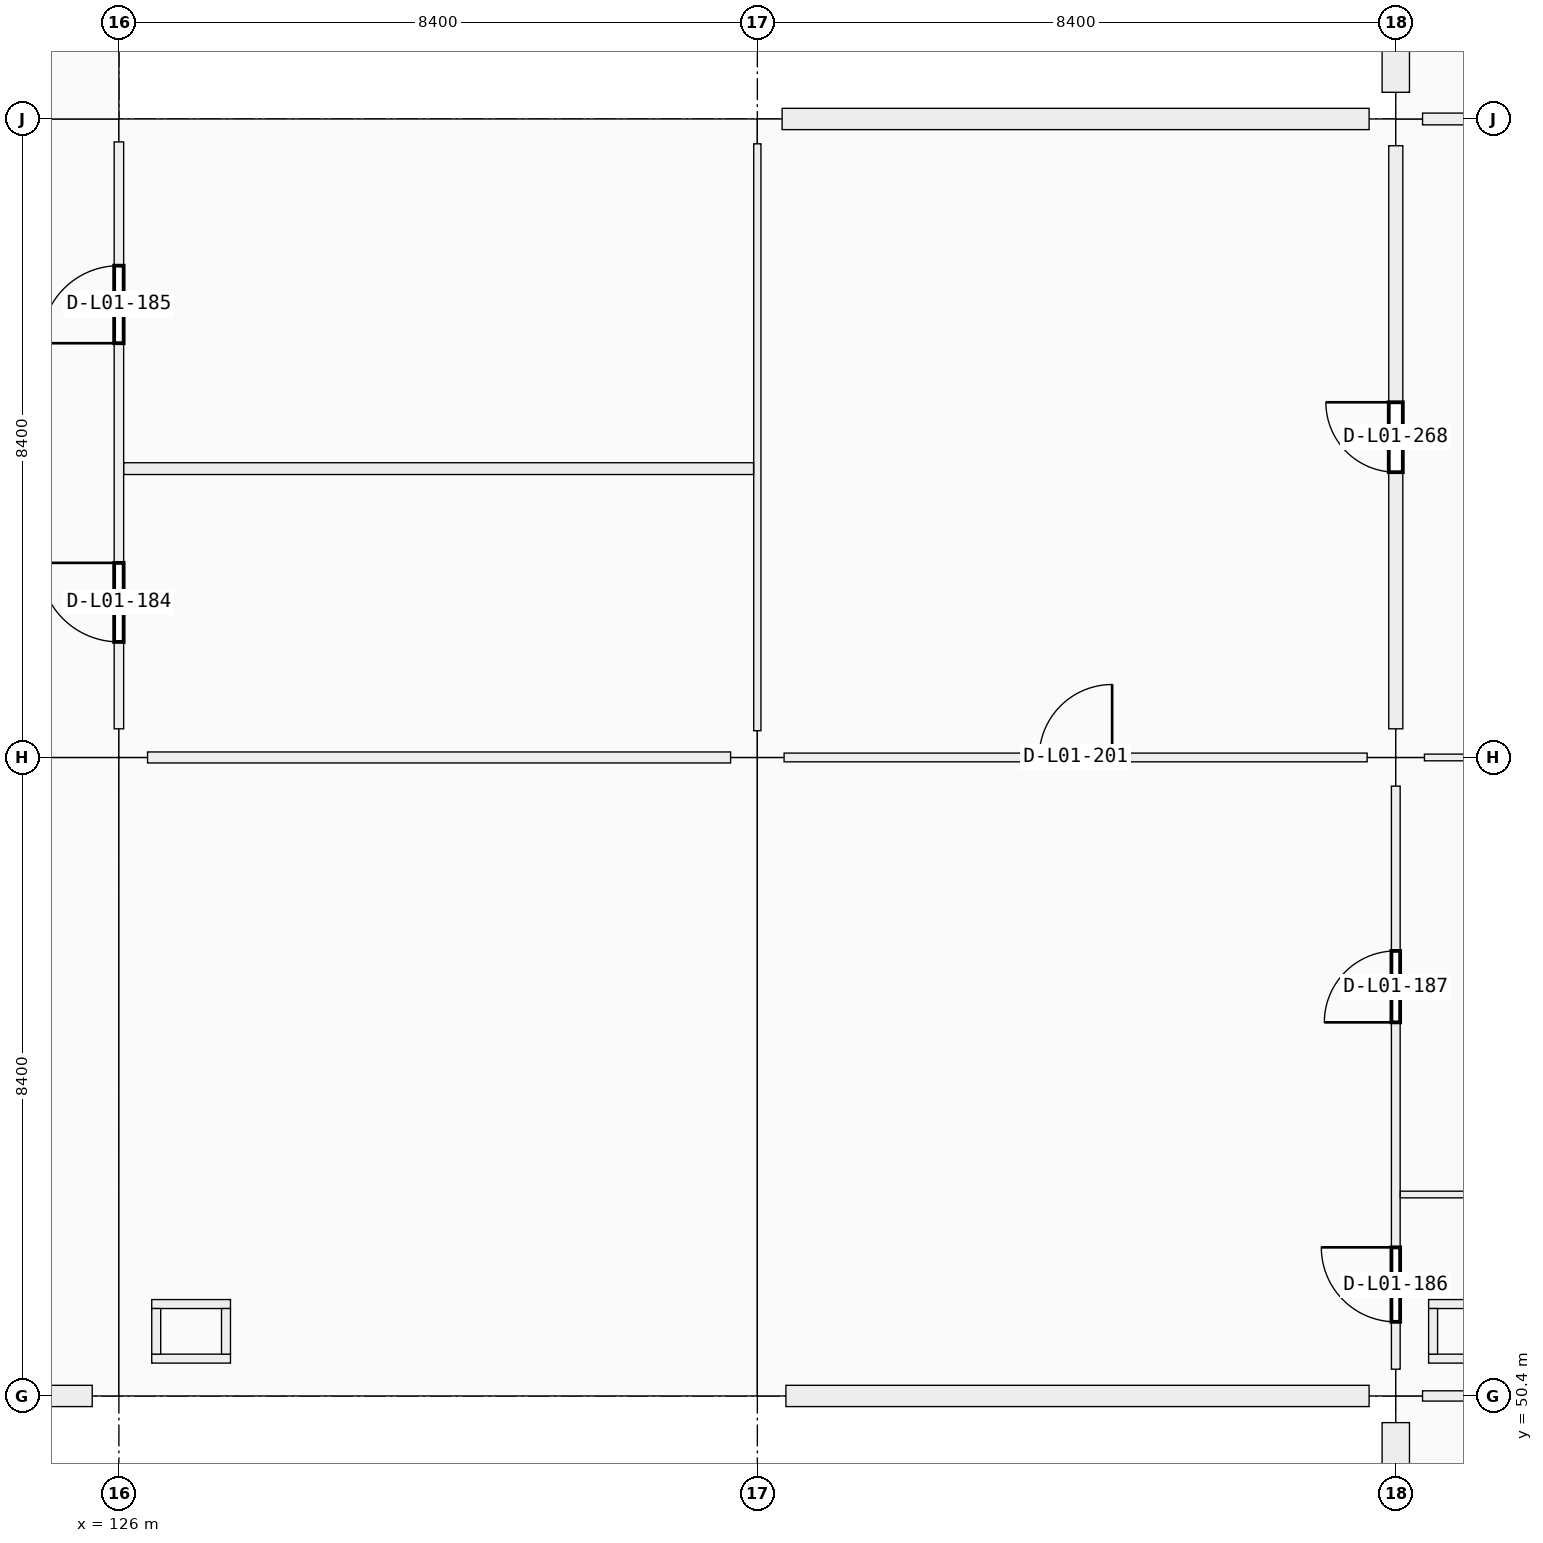
"""IFC4 building model, lengths in metres.
Left out: names, types, materials, properties, quantities, classifications, styles, units other than length and angle.
Written with IfcOpenShell. Run it as: python <this file> out.ifc"""

import sys

from ifc_helpers import new_model, si_unit, direction, frame, frame_2d, origin, origin_2d, place, context, subcontext, project, spatial, rectangle, extrude, element, fill, save


model = new_model("IFC4")
c1 = context("Model", 3, precision=1e-05, world=origin(), true_north=direction((0.0, 1.0)))
c2 = subcontext(c1, "Body", "Model", "MODEL_VIEW")
j1 = project(units=[si_unit("LENGTHUNIT", "METRE"), si_unit("PLANEANGLEUNIT", "RADIAN")], contexts=[c1])
p1 = place(None, origin())
s1 = spatial("IfcSite", under=j1, at=p1, CompositionType="ELEMENT")
p2 = place(p1, origin())
s2 = spatial("IfcBuilding", under=s1, at=p2, CompositionType="ELEMENT")
p3 = place(p2, frame((0.0, 0.0, 5.76)))
s3 = spatial("IfcBuildingStorey", under=s2, at=p3, CompositionType="ELEMENT", Elevation=5.76)
p4 = place(p3, frame((126.0, 50.4, 0.0), z_axis=(0.0, 0.0, 1.0), x_axis=(1.0, 0.0, 0.0)))
e1 = element("IfcColumn", 1, at=p4, inside=s3, PredefinedType="COLUMN", context=c2, shape_type="SweptSolid", body=[
    extrude(rectangle(XDim=0.7, YDim=0.7, at=origin_2d()), origin(), (0.0, 0.0, 1.0), 4.5),
])
p5 = place(p3, frame((126.0, 58.8, 0.0), z_axis=(0.0, 0.0, 1.0), x_axis=(1.0, 0.0, 0.0)))
e2 = element("IfcColumn", 2, at=p5, inside=s3, PredefinedType="COLUMN", context=c2, shape_type="SweptSolid", body=[
    extrude(rectangle(XDim=0.75, YDim=0.75, at=origin_2d()), origin(), (0.0, 0.0, 1.0), 4.5),
])
p6 = place(p3, frame((126.0, 67.2, 0.0), z_axis=(0.0, 0.0, 1.0), x_axis=(1.0, 0.0, 0.0)))
e3 = element("IfcColumn", 3, at=p6, inside=s3, PredefinedType="COLUMN", context=c2, shape_type="SweptSolid", body=[
    extrude(rectangle(XDim=0.6, YDim=0.6, at=origin_2d()), origin(), (0.0, 0.0, 1.0), 4.5),
])
p7 = place(p3, frame((134.4, 50.4, 0.0), z_axis=(0.0, 0.0, 1.0), x_axis=(1.0, 0.0, 0.0)))
e4 = element("IfcColumn", 4, at=p7, inside=s3, PredefinedType="COLUMN", context=c2, shape_type="SweptSolid", body=[
    extrude(rectangle(XDim=0.75, YDim=0.75, at=origin_2d()), origin(), (0.0, 0.0, 1.0), 4.5),
])
p8 = place(p3, frame((134.4, 58.8, 0.0), z_axis=(0.0, 0.0, 1.0), x_axis=(1.0, 0.0, 0.0)))
e5 = element("IfcColumn", 5, at=p8, inside=s3, PredefinedType="COLUMN", context=c2, shape_type="SweptSolid", body=[
    extrude(rectangle(XDim=0.7, YDim=0.7, at=origin_2d()), origin(), (0.0, 0.0, 1.0), 4.5),
])
p9 = place(p3, frame((134.4, 67.2, 0.0), z_axis=(0.0, 0.0, 1.0), x_axis=(1.0, 0.0, 0.0)))
e6 = element("IfcColumn", 6, at=p9, inside=s3, PredefinedType="COLUMN", context=c2, shape_type="SweptSolid", body=[
    extrude(rectangle(XDim=0.65, YDim=0.65, at=origin_2d()), origin(), (0.0, 0.0, 1.0), 4.5),
])
p10 = place(p3, frame((142.8, 50.4, 0.0), z_axis=(0.0, 0.0, 1.0), x_axis=(1.0, 0.0, 0.0)))
e7 = element("IfcColumn", 7, at=p10, inside=s3, PredefinedType="COLUMN", context=c2, shape_type="SweptSolid", body=[
    extrude(rectangle(XDim=0.7, YDim=0.7, at=origin_2d()), origin(), (0.0, 0.0, 1.0), 4.5),
])
p11 = place(p3, frame((142.8, 58.8, 0.0), z_axis=(0.0, 0.0, 1.0), x_axis=(1.0, 0.0, 0.0)))
e8 = element("IfcColumn", 8, at=p11, inside=s3, PredefinedType="COLUMN", context=c2, shape_type="SweptSolid", body=[
    extrude(rectangle(XDim=0.75, YDim=0.75, at=origin_2d()), origin(), (0.0, 0.0, 1.0), 4.5),
])
p12 = place(p3, frame((142.8, 67.2, 0.0), z_axis=(0.0, 0.0, 1.0), x_axis=(1.0, 0.0, 0.0)))
e9 = element("IfcColumn", 9, at=p12, inside=s3, PredefinedType="COLUMN", context=c2, shape_type="SweptSolid", body=[
    extrude(rectangle(XDim=0.7, YDim=0.7, at=origin_2d()), origin(), (0.0, 0.0, 1.0), 4.5),
])
p13 = place(p3, frame((125.649, 50.4, 0.0), z_axis=(0.0, 0.0, 1.0), x_axis=(-1.0, 0.0, 0.0)))
e10 = element("IfcWall", 10, at=p13, inside=s3, PredefinedType="SOLIDWALL", context=c2, shape_type="SweptSolid", body=[
    extrude(rectangle(XDim=7.673, YDim=0.28, at=frame_2d((3.836, 0.0))), origin(), (0.0, 0.0, 1.0), 3.4),
])
p14 = place(p13, frame((2.236, 0.0, 0.9)))
e11 = element("IfcOpeningElement", 11, at=p14, cuts=e10, PredefinedType="OPENING", context=c2, shape_type="SweptSolid", body=[
    extrude(rectangle(XDim=3.2, YDim=1.75, at=frame_2d((1.6, 0.875))), frame((0.0, 0.14, 0.0), z_axis=(0.0, -1.0, 0.0), x_axis=(1.0, 0.0, 0.0)), (0.0, 0.0, 1.0), 0.28),
])
p15 = place(p3, frame((142.449, 50.4, 0.0), z_axis=(0.0, 0.0, 1.0), x_axis=(-1.0, 0.0, 0.0)))
e12 = element("IfcWall", 12, at=p15, inside=s3, PredefinedType="SOLIDWALL", context=c2, shape_type="SweptSolid", body=[
    extrude(rectangle(XDim=7.673, YDim=0.28, at=frame_2d((3.836, 0.0))), origin(), (0.0, 0.0, 1.0), 3.4),
])
p16 = place(p3, frame((134.726, 67.2, 0.0), z_axis=(0.0, 0.0, 1.0), x_axis=(1.0, 0.0, 0.0)))
e13 = element("IfcWall", 13, at=p16, inside=s3, PredefinedType="SOLIDWALL", context=c2, shape_type="SweptSolid", body=[
    extrude(rectangle(XDim=7.723, YDim=0.28, at=frame_2d((3.861, 0.0))), origin(), (0.0, 0.0, 1.0), 3.4),
])
p17 = place(p16, frame((2.662, 0.0, 0.9)))
e14 = element("IfcOpeningElement", 14, at=p17, cuts=e13, PredefinedType="OPENING", context=c2, shape_type="SweptSolid", body=[
    extrude(rectangle(XDim=2.4, YDim=2.25, at=frame_2d((1.2, 1.125))), frame((0.0, 0.14, 0.0), z_axis=(0.0, -1.0, 0.0), x_axis=(1.0, 0.0, 0.0)), (0.0, 0.0, 1.0), 0.28),
])
p18 = place(p3, frame((142.8, 42.376, 0.0), z_axis=(0.0, 0.0, 1.0), x_axis=(0.0, 1.0, 0.0)))
e15 = element("IfcWall", 15, at=p18, inside=s3, PredefinedType="SOLIDWALL", context=c2, shape_type="SweptSolid", body=[
    extrude(rectangle(XDim=7.673, YDim=0.36, at=frame_2d((3.836, 0.0))), origin(), (0.0, 0.0, 1.0), 3.4),
])
p19 = place(p18, frame((3.386, 0.0, 0.9)))
e16 = element("IfcOpeningElement", 16, at=p19, cuts=e15, PredefinedType="OPENING", context=c2, shape_type="SweptSolid", body=[
    extrude(rectangle(XDim=0.9, YDim=1.5, at=frame_2d((0.45, 0.75))), frame((0.0, 0.18, 0.0), z_axis=(0.0, -1.0, 0.0), x_axis=(1.0, 0.0, 0.0)), (0.0, 0.0, 1.0), 0.36),
])
p20 = place(p3, frame((142.8, 67.551, 0.0), z_axis=(0.0, 0.0, 1.0), x_axis=(0.0, 1.0, 0.0)))
e17 = element("IfcWall", 17, at=p20, inside=s3, PredefinedType="SOLIDWALL", context=c2, shape_type="SweptSolid", body=[
    extrude(rectangle(XDim=7.773, YDim=0.36, at=frame_2d((3.886, 0.0))), origin(), (0.0, 0.0, 1.0), 3.4),
])
p21 = place(p20, frame((3.036, 0.0, 0.9)))
e18 = element("IfcOpeningElement", 18, at=p21, cuts=e17, PredefinedType="OPENING", context=c2, shape_type="SweptSolid", body=[
    extrude(rectangle(XDim=1.7, YDim=1.85, at=frame_2d((0.85, 0.925))), frame((0.0, 0.18, 0.0), z_axis=(0.0, -1.0, 0.0), x_axis=(1.0, 0.0, 0.0)), (0.0, 0.0, 1.0), 0.36),
])
for number, where, z_axis, x_axis in (
    (19, (126.432, 50.891, 0.0), (0.0, 0.0, 1.0), (1.0, 0.0, 0.0)),
    (20, (126.432, 51.609, 0.0), (0.0, 0.0, 1.0), (1.0, 0.0, 0.0)),
):
    element("IfcWall", number, at=place(p3, frame(where, z_axis=z_axis, x_axis=x_axis)), inside=s3, PredefinedType="PARTITIONING", context=c2, shape_type="SweptSolid", body=[
        extrude(rectangle(XDim=1.036, YDim=0.118, at=frame_2d((0.518, 0.0))), origin(), (0.0, 0.0, 1.0), 3.48),
    ])
for number, where, z_axis, x_axis in (
    (21, (126.491, 50.95, 0.0), (0.0, 0.0, 1.0), (0.0, 1.0, 0.0)),
    (22, (127.409, 50.95, 0.0), (0.0, 0.0, 1.0), (0.0, 1.0, 0.0)),
):
    element("IfcWall", number, at=place(p3, frame(where, z_axis=z_axis, x_axis=x_axis)), inside=s3, PredefinedType="PARTITIONING", context=c2, shape_type="SweptSolid", body=[
        extrude(rectangle(XDim=0.6, YDim=0.118, at=frame_2d((0.3, 0.0))), origin(), (0.0, 0.0, 1.0), 3.48),
    ])
for number, where, z_axis, x_axis in (
    (23, (143.232, 50.891, 0.0), (0.0, 0.0, 1.0), (1.0, 0.0, 0.0)),
    (24, (143.232, 51.609, 0.0), (0.0, 0.0, 1.0), (1.0, 0.0, 0.0)),
):
    element("IfcWall", number, at=place(p3, frame(where, z_axis=z_axis, x_axis=x_axis)), inside=s3, PredefinedType="PARTITIONING", context=c2, shape_type="SweptSolid", body=[
        extrude(rectangle(XDim=1.036, YDim=0.118, at=frame_2d((0.518, 0.0))), origin(), (0.0, 0.0, 1.0), 3.48),
    ])
p22 = place(p3, frame((143.291, 50.95, 0.0), z_axis=(0.0, 0.0, 1.0), x_axis=(0.0, 1.0, 0.0)))
e25 = element("IfcWall", 25, at=p22, inside=s3, PredefinedType="PARTITIONING", context=c2, shape_type="SweptSolid", body=[
    extrude(rectangle(XDim=0.6, YDim=0.118, at=frame_2d((0.3, 0.0))), origin(), (0.0, 0.0, 1.0), 3.48),
])
p23 = place(p3, frame((126.377, 58.8, 0.0), z_axis=(0.0, 0.0, 1.0), x_axis=(1.0, 0.0, 0.0)))
e26 = element("IfcWall", 26, at=p23, inside=s3, PredefinedType="PARTITIONING", context=c2, shape_type="SweptSolid", body=[
    extrude(rectangle(XDim=7.671, YDim=0.145, at=frame_2d((3.835, 0.0))), origin(), (0.0, 0.0, 1.0), 2.4),
])
p24 = place(p3, frame((134.752, 58.8, 0.0), z_axis=(0.0, 0.0, 1.0), x_axis=(1.0, 0.0, 0.0)))
e27 = element("IfcWall", 27, at=p24, inside=s3, PredefinedType="PARTITIONING", context=c2, shape_type="SweptSolid", body=[
    extrude(rectangle(XDim=7.671, YDim=0.115, at=frame_2d((3.835, 0.0))), origin(), (0.0, 0.0, 1.0), 2.4),
])
p25 = place(p24, frame((3.356, 0.0, 0.0)))
e28 = element("IfcOpeningElement", 28, at=p25, cuts=e27, PredefinedType="OPENING", context=c2, shape_type="SweptSolid", body=[
    extrude(rectangle(XDim=0.96, YDim=2.18, at=frame_2d((0.48, 1.09))), frame((0.0, 0.058, 0.0), z_axis=(0.0, -1.0, 0.0), x_axis=(1.0, 0.0, 0.0)), (0.0, 0.0, 1.0), 0.115),
])
p26 = place(p3, frame((143.152, 50.4, 0.0), z_axis=(0.0, 0.0, 1.0), x_axis=(1.0, 0.0, 0.0)))
e29 = element("IfcWall", 29, at=p26, inside=s3, PredefinedType="PARTITIONING", context=c2, shape_type="SweptSolid", body=[
    extrude(rectangle(XDim=7.671, YDim=0.135, at=frame_2d((3.835, 0.0))), origin(), (0.0, 0.0, 1.0), 2.4),
])
p27 = place(p3, frame((143.177, 58.8, 0.0), z_axis=(0.0, 0.0, 1.0), x_axis=(1.0, 0.0, 0.0)))
e30 = element("IfcWall", 30, at=p27, inside=s3, PredefinedType="PARTITIONING", context=c2, shape_type="SweptSolid", body=[
    extrude(rectangle(XDim=7.671, YDim=0.088, at=frame_2d((3.835, 0.0))), origin(), (0.0, 0.0, 1.0), 2.4),
])
p28 = place(p3, frame((143.152, 67.2, 0.0), z_axis=(0.0, 0.0, 1.0), x_axis=(1.0, 0.0, 0.0)))
e31 = element("IfcWall", 31, at=p28, inside=s3, PredefinedType="PARTITIONING", context=c2, shape_type="SweptSolid", body=[
    extrude(rectangle(XDim=7.671, YDim=0.155, at=frame_2d((3.835, 0.0))), origin(), (0.0, 0.0, 1.0), 2.4),
])
p29 = place(p28, frame((3.336, 0.0, 0.0)))
e32 = element("IfcOpeningElement", 32, at=p29, cuts=e31, PredefinedType="OPENING", context=c2, shape_type="SweptSolid", body=[
    extrude(rectangle(XDim=1.0, YDim=2.2, at=frame_2d((0.5, 1.1))), frame((0.0, 0.078, 0.0), z_axis=(0.0, -1.0, 0.0), x_axis=(1.0, 0.0, 0.0)), (0.0, 0.0, 1.0), 0.155),
])
p30 = place(p3, frame((126.0, 59.177, 0.0), z_axis=(0.0, 0.0, 1.0), x_axis=(0.0, 1.0, 0.0)))
e33 = element("IfcWall", 33, at=p30, inside=s3, PredefinedType="PARTITIONING", context=c2, shape_type="SweptSolid", body=[
    extrude(rectangle(XDim=7.721, YDim=0.125, at=frame_2d((3.86, 0.0))), origin(), (0.0, 0.0, 1.0), 2.4),
])
p31 = place(p30, frame((1.143, 0.0, 0.0)))
e34 = element("IfcOpeningElement", 34, at=p31, cuts=e33, PredefinedType="OPENING", context=c2, shape_type="SweptSolid", body=[
    extrude(rectangle(XDim=1.04, YDim=2.2, at=frame_2d((0.52, 1.1))), frame((0.0, 0.062, 0.0), z_axis=(0.0, -1.0, 0.0), x_axis=(1.0, 0.0, 0.0)), (0.0, 0.0, 1.0), 0.125),
])
p32 = place(p30, frame((5.073, 0.0, 0.0)))
e35 = element("IfcOpeningElement", 35, at=p32, cuts=e33, PredefinedType="OPENING", context=c2, shape_type="SweptSolid", body=[
    extrude(rectangle(XDim=1.02, YDim=2.2, at=frame_2d((0.51, 1.1))), frame((0.0, 0.062, 0.0), z_axis=(0.0, -1.0, 0.0), x_axis=(1.0, 0.0, 0.0)), (0.0, 0.0, 1.0), 0.125),
])
p33 = place(p3, frame((134.4, 59.152, 0.0), z_axis=(0.0, 0.0, 1.0), x_axis=(0.0, 1.0, 0.0)))
e36 = element("IfcWall", 36, at=p33, inside=s3, PredefinedType="PARTITIONING", context=c2, shape_type="SweptSolid", body=[
    extrude(rectangle(XDim=7.721, YDim=0.095, at=frame_2d((3.86, 0.0))), origin(), (0.0, 0.0, 1.0), 2.4),
])
p34 = place(p3, frame((142.8, 50.752, 0.0), z_axis=(0.0, 0.0, 1.0), x_axis=(0.0, 1.0, 0.0)))
e37 = element("IfcWall", 37, at=p34, inside=s3, PredefinedType="PARTITIONING", context=c2, shape_type="SweptSolid", body=[
    extrude(rectangle(XDim=7.671, YDim=0.115, at=frame_2d((3.835, 0.0))), origin(), (0.0, 0.0, 1.0), 2.4),
])
p35 = place(p34, frame((0.623, 0.0, 0.0)))
e38 = element("IfcOpeningElement", 38, at=p35, cuts=e37, PredefinedType="OPENING", context=c2, shape_type="SweptSolid", body=[
    extrude(rectangle(XDim=0.98, YDim=2.08, at=frame_2d((0.49, 1.04))), frame((0.0, 0.058, 0.0), z_axis=(0.0, -1.0, 0.0), x_axis=(1.0, 0.0, 0.0)), (0.0, 0.0, 1.0), 0.115),
])
p36 = place(p34, frame((4.563, 0.0, 0.0)))
e39 = element("IfcOpeningElement", 39, at=p36, cuts=e37, PredefinedType="OPENING", context=c2, shape_type="SweptSolid", body=[
    extrude(rectangle(XDim=0.94, YDim=2.08, at=frame_2d((0.47, 1.04))), frame((0.0, 0.058, 0.0), z_axis=(0.0, -1.0, 0.0), x_axis=(1.0, 0.0, 0.0)), (0.0, 0.0, 1.0), 0.115),
])
p37 = place(p3, frame((142.8, 59.177, 0.0), z_axis=(0.0, 0.0, 1.0), x_axis=(0.0, 1.0, 0.0)))
e40 = element("IfcWall", 40, at=p37, inside=s3, PredefinedType="PARTITIONING", context=c2, shape_type="SweptSolid", body=[
    extrude(rectangle(XDim=7.671, YDim=0.185, at=frame_2d((3.835, 0.0))), origin(), (0.0, 0.0, 1.0), 2.4),
])
p38 = place(p37, frame((3.376, 0.0, 0.0)))
e41 = element("IfcOpeningElement", 41, at=p38, cuts=e40, PredefinedType="OPENING", context=c2, shape_type="SweptSolid", body=[
    extrude(rectangle(XDim=0.92, YDim=2.15, at=frame_2d((0.46, 1.075))), frame((0.0, 0.093, 0.0), z_axis=(0.0, -1.0, 0.0), x_axis=(1.0, 0.0, 0.0)), (0.0, 0.0, 1.0), 0.185),
])
p39 = place(p3, frame((126.064, 62.6, 0.0), z_axis=(0.0, 0.0, 1.0), x_axis=(1.0, 0.0, 0.0)))
e42 = element("IfcWall", 42, at=p39, inside=s3, PredefinedType="PARTITIONING", context=c2, shape_type="SweptSolid", body=[
    extrude(rectangle(XDim=8.286, YDim=0.155, at=frame_2d((4.143, 0.0))), origin(), (0.0, 0.0, 1.0), 2.4),
])
p40 = place(p3, frame((142.86, 53.05, 0.0), z_axis=(0.0, 0.0, 1.0), x_axis=(1.0, 0.0, 0.0)))
e43 = element("IfcWall", 43, at=p40, inside=s3, PredefinedType="PARTITIONING", context=c2, shape_type="SweptSolid", body=[
    extrude(rectangle(XDim=8.294, YDim=0.088, at=frame_2d((4.147, 0.0))), origin(), (0.0, 0.0, 1.0), 2.4),
])
p41 = place(p17, origin())
e44 = element("IfcWindow", 44, at=p41, inside=s3, PartitioningType="SINGLE_PANEL", PredefinedType="WINDOW", context=c2, shape_type="SweptSolid", body=[
    extrude(rectangle(XDim=2.4, YDim=2.25, at=frame_2d((1.2, 1.125))), frame((0.0, 0.03, 0.0), z_axis=(0.0, -1.0, 0.0), x_axis=(1.0, 0.0, 0.0)), (0.0, 0.0, 1.0), 0.06),
])
fill(e14, e44)
p42 = place(p31, origin())
e45 = element("IfcDoor", 45, at=p42, inside=s3, OperationType="SINGLE_SWING_RIGHT", PredefinedType="DOOR", context=c2, shape_type="SweptSolid", body=[
    extrude(rectangle(XDim=1.04, YDim=2.2, at=frame_2d((0.52, 1.1))), frame((0.0, 0.025, 0.0), z_axis=(0.0, -1.0, 0.0), x_axis=(1.0, 0.0, 0.0)), (0.0, 0.0, 1.0), 0.05),
])
fill(e34, e45)
p43 = place(p32, origin())
e46 = element("IfcDoor", 46, at=p43, inside=s3, OperationType="SINGLE_SWING_LEFT", PredefinedType="DOOR", context=c2, shape_type="SweptSolid", body=[
    extrude(rectangle(XDim=1.02, YDim=2.2, at=frame_2d((0.51, 1.1))), frame((0.0, 0.025, 0.0), z_axis=(0.0, -1.0, 0.0), x_axis=(1.0, 0.0, 0.0)), (0.0, 0.0, 1.0), 0.05),
])
fill(e35, e46)
p44 = place(p35, origin())
e47 = element("IfcDoor", 47, at=p44, inside=s3, OperationType="SINGLE_SWING_RIGHT", PredefinedType="DOOR", context=c2, shape_type="SweptSolid", body=[
    extrude(rectangle(XDim=0.98, YDim=2.08, at=frame_2d((0.49, 1.04))), frame((0.0, 0.025, 0.0), z_axis=(0.0, -1.0, 0.0), x_axis=(1.0, 0.0, 0.0)), (0.0, 0.0, 1.0), 0.05),
])
fill(e38, e47)
p45 = place(p36, origin())
e48 = element("IfcDoor", 48, at=p45, inside=s3, OperationType="SINGLE_SWING_LEFT", PredefinedType="DOOR", context=c2, shape_type="SweptSolid", body=[
    extrude(rectangle(XDim=0.94, YDim=2.08, at=frame_2d((0.47, 1.04))), frame((0.0, 0.025, 0.0), z_axis=(0.0, -1.0, 0.0), x_axis=(1.0, 0.0, 0.0)), (0.0, 0.0, 1.0), 0.05),
])
fill(e39, e48)
p46 = place(p25, origin())
e49 = element("IfcDoor", 49, at=p46, inside=s3, OperationType="SINGLE_SWING_RIGHT", PredefinedType="DOOR", context=c2, shape_type="SweptSolid", body=[
    extrude(rectangle(XDim=0.96, YDim=2.18, at=frame_2d((0.48, 1.09))), frame((0.0, 0.025, 0.0), z_axis=(0.0, -1.0, 0.0), x_axis=(1.0, 0.0, 0.0)), (0.0, 0.0, 1.0), 0.05),
])
fill(e28, e49)
p47 = place(p38, origin())
e50 = element("IfcDoor", 50, at=p47, inside=s3, OperationType="SINGLE_SWING_RIGHT", PredefinedType="DOOR", context=c2, shape_type="SweptSolid", body=[
    extrude(rectangle(XDim=0.92, YDim=2.15, at=frame_2d((0.46, 1.075))), frame((0.0, 0.025, 0.0), z_axis=(0.0, -1.0, 0.0), x_axis=(1.0, 0.0, 0.0)), (0.0, 0.0, 1.0), 0.05),
])
fill(e41, e50)
save(model, sys.argv[1])
